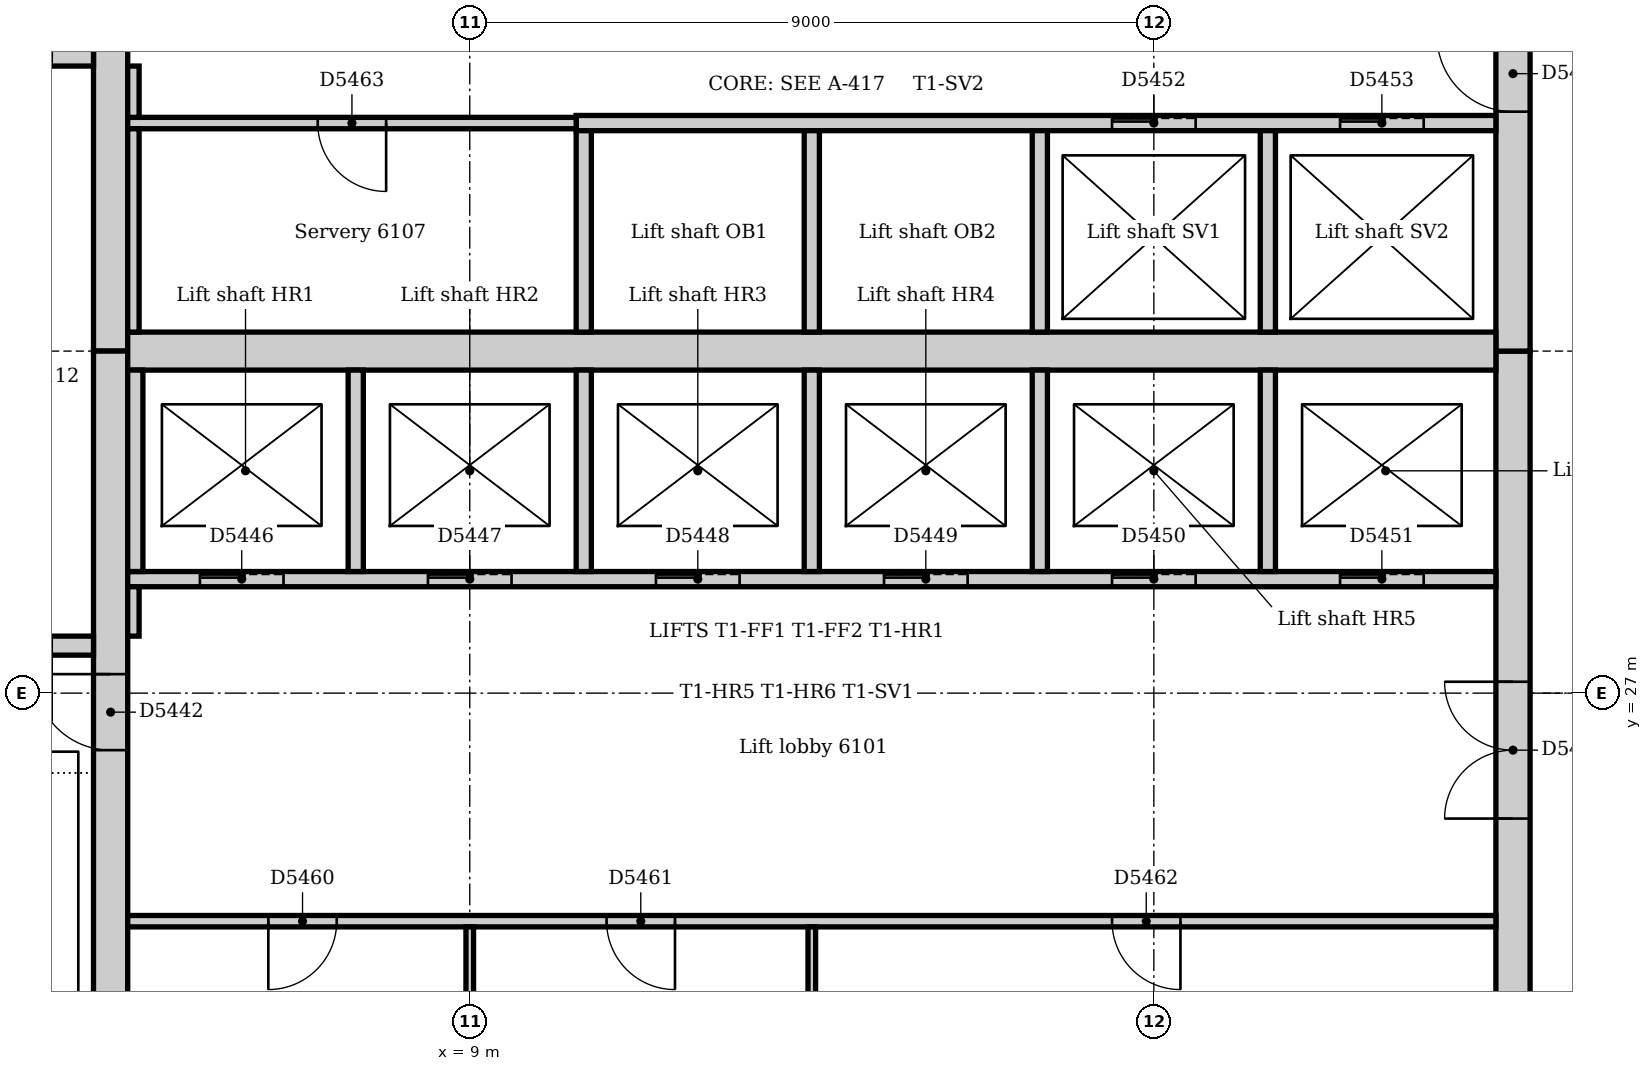
"""IFC4 building model, lengths in metres.
Left out: names, types, materials, properties, quantities, classifications, styles, units other than length and angle.
Written with IfcOpenShell. Run it as: python <this file> out.ifc"""

import sys

from ifc_helpers import new_model, si_unit, direction, frame, frame_2d, origin, place, context, subcontext, project, spatial, rectangle, extrude, element, fill, save


model = new_model("IFC4")
c1 = context("Model", 3, precision=1e-05, world=origin(), true_north=direction((0.0, 1.0)))
c2 = subcontext(c1, "Body", "Model", "MODEL_VIEW")
j1 = project(units=[si_unit("LENGTHUNIT", "METRE"), si_unit("PLANEANGLEUNIT", "RADIAN")], contexts=[c1])
p1 = place(None, origin())
s1 = spatial("IfcSite", under=j1, at=p1, CompositionType="ELEMENT")
p2 = place(p1, origin())
s2 = spatial("IfcBuilding", under=s1, at=p2, CompositionType="ELEMENT")
p3 = place(p2, frame((0.0, 0.0, 255.0)))
s3 = spatial("IfcBuildingStorey", under=s2, at=p3, CompositionType="ELEMENT", Elevation=255.0)
p4 = place(p3, frame((22.725, 21.0, 0.0), z_axis=(0.0, 0.0, 1.0), x_axis=(0.0, 1.0, 0.0)))
e1 = element("IfcWall", 1, at=p4, inside=s3, PredefinedType="SOLIDWALL", context=c2, shape_type="SweptSolid", body=[
    extrude(rectangle(XDim=10.5, YDim=0.45, at=frame_2d((5.25, 0.0))), origin(), (0.0, 0.0, 1.0), 4.0),
])
p5 = place(p4, frame((4.35, 0.0, 0.0)))
e2 = element("IfcOpeningElement", 2, at=p5, cuts=e1, PredefinedType="OPENING", context=c2, shape_type="SweptSolid", body=[
    extrude(rectangle(XDim=1.8, YDim=2.1, at=frame_2d((0.9, 1.05))), frame((0.0, 0.235, 0.0), z_axis=(0.0, -1.0, 0.0), x_axis=(1.0, 0.0, 0.0)), (0.0, 0.0, 1.0), 0.47),
])
p6 = place(p3, frame((22.725, 31.5, 0.0), z_axis=(0.0, 0.0, 1.0), x_axis=(0.0, 1.0, 0.0)))
e3 = element("IfcWall", 3, at=p6, inside=s3, PredefinedType="SOLIDWALL", context=c2, shape_type="SweptSolid", body=[
    extrude(rectangle(XDim=10.5, YDim=0.45, at=frame_2d((5.25, 0.0))), origin(), (0.0, 0.0, 1.0), 4.0),
])
p7 = place(p6, frame((3.15, 0.0, 0.0)))
e4 = element("IfcOpeningElement", 4, at=p7, cuts=e3, PredefinedType="OPENING", context=c2, shape_type="SweptSolid", body=[
    extrude(rectangle(XDim=1.0, YDim=2.1, at=frame_2d((0.5, 1.05))), frame((0.0, 0.235, 0.0), z_axis=(0.0, -1.0, 0.0), x_axis=(1.0, 0.0, 0.0)), (0.0, 0.0, 1.0), 0.47),
])
p8 = place(p6, frame((5.2, 0.0, 0.0)))
e5 = element("IfcOpeningElement", 5, at=p8, cuts=e3, PredefinedType="OPENING", context=c2, shape_type="SweptSolid", body=[
    extrude(rectangle(XDim=1.0, YDim=2.1, at=frame_2d((0.5, 1.05))), frame((0.0, 0.235, 0.0), z_axis=(0.0, -1.0, 0.0), x_axis=(1.0, 0.0, 0.0)), (0.0, 0.0, 1.0), 0.47),
])
p9 = place(p3, frame((4.275, 42.0, 0.0), z_axis=(0.0, 0.0, 1.0), x_axis=(0.0, -1.0, 0.0)))
e6 = element("IfcWall", 6, at=p9, inside=s3, PredefinedType="SOLIDWALL", context=c2, shape_type="SweptSolid", body=[
    extrude(rectangle(XDim=10.5, YDim=0.45, at=frame_2d((5.25, 0.0))), origin(), (0.0, 0.0, 1.0), 4.0),
])
p10 = place(p9, frame((5.3, 0.0, 0.0)))
e7 = element("IfcOpeningElement", 7, at=p10, cuts=e6, PredefinedType="OPENING", context=c2, shape_type="SweptSolid", body=[
    extrude(rectangle(XDim=1.0, YDim=2.1, at=frame_2d((0.5, 1.05))), frame((0.0, 0.235, 0.0), z_axis=(0.0, -1.0, 0.0), x_axis=(1.0, 0.0, 0.0)), (0.0, 0.0, 1.0), 0.47),
])
p11 = place(p3, frame((4.275, 31.5, 0.0), z_axis=(0.0, 0.0, 1.0), x_axis=(0.0, -1.0, 0.0)))
e8 = element("IfcWall", 8, at=p11, inside=s3, PredefinedType="SOLIDWALL", context=c2, shape_type="SweptSolid", body=[
    extrude(rectangle(XDim=10.5, YDim=0.45, at=frame_2d((5.25, 0.0))), origin(), (0.0, 0.0, 1.0), 4.0),
])
p12 = place(p11, frame((4.25, 0.0, 0.0)))
e9 = element("IfcOpeningElement", 9, at=p12, cuts=e8, PredefinedType="OPENING", context=c2, shape_type="SweptSolid", body=[
    extrude(rectangle(XDim=1.0, YDim=2.1, at=frame_2d((0.5, 1.05))), frame((0.0, 0.235, 0.0), z_axis=(0.0, -1.0, 0.0), x_axis=(1.0, 0.0, 0.0)), (0.0, 0.0, 1.0), 0.47),
])
p13 = place(p3, frame((4.5, 31.5, 0.0), z_axis=(0.0, 0.0, 1.0), x_axis=(1.0, 0.0, 0.0)))
e10 = element("IfcWall", 10, at=p13, inside=s3, PredefinedType="SOLIDWALL", context=c2, shape_type="SweptSolid", body=[
    extrude(rectangle(XDim=18.0, YDim=0.5, at=frame_2d((9.0, 0.0))), origin(), (0.0, 0.0, 1.0), 4.0),
])
p14 = place(p3, frame((4.05, 27.625, 0.0), z_axis=(0.0, 0.0, 1.0), x_axis=(-1.0, 0.0, 0.0)))
e11 = element("IfcWall", 11, at=p14, inside=s3, PredefinedType="SOLIDWALL", context=c2, shape_type="SweptSolid", body=[
    extrude(rectangle(XDim=3.69, YDim=0.25, at=frame_2d((1.845, 0.0))), origin(), (0.0, 0.0, 1.0), 4.0),
])
p15 = place(p14, frame((0.55, 0.0, 0.0)))
e12 = element("IfcOpeningElement", 12, at=p15, cuts=e11, PredefinedType="OPENING", context=c2, shape_type="SweptSolid", body=[
    extrude(rectangle(XDim=1.0, YDim=2.1, at=frame_2d((0.5, 1.05))), frame((0.0, 0.135, 0.0), z_axis=(0.0, -1.0, 0.0), x_axis=(1.0, 0.0, 0.0)), (0.0, 0.0, 1.0), 0.27),
])
p16 = place(p3, frame((0.36, 35.375, 0.0), z_axis=(0.0, 0.0, 1.0), x_axis=(1.0, 0.0, 0.0)))
e13 = element("IfcWall", 13, at=p16, inside=s3, PredefinedType="SOLIDWALL", context=c2, shape_type="SweptSolid", body=[
    extrude(rectangle(XDim=3.69, YDim=0.25, at=frame_2d((1.845, 0.0))), origin(), (0.0, 0.0, 1.0), 4.0),
])
p17 = place(p16, frame((2.14, 0.0, 0.0)))
e14 = element("IfcOpeningElement", 14, at=p17, cuts=e13, PredefinedType="OPENING", context=c2, shape_type="SweptSolid", body=[
    extrude(rectangle(XDim=1.0, YDim=2.1, at=frame_2d((0.5, 1.05))), frame((0.0, 0.135, 0.0), z_axis=(0.0, -1.0, 0.0), x_axis=(1.0, 0.0, 0.0)), (0.0, 0.0, 1.0), 0.27),
])
p18 = place(p3, frame((4.5, 28.5, 0.0), z_axis=(0.0, 0.0, 1.0), x_axis=(1.0, 0.0, 0.0)))
e15 = element("IfcWall", 15, at=p18, inside=s3, PredefinedType="PARTITIONING", context=c2, shape_type="SweptSolid", body=[
    extrude(rectangle(XDim=18.0, YDim=0.2, at=frame_2d((9.0, 0.0))), origin(), (0.0, 0.0, 1.0), 3.85),
])
p19 = place(p18, frame((0.95, 0.0, 0.0)))
e16 = element("IfcOpeningElement", 16, at=p19, cuts=e15, PredefinedType="OPENING", context=c2, shape_type="SweptSolid", body=[
    extrude(rectangle(XDim=1.1, YDim=2.1, at=frame_2d((0.55, 1.05))), frame((0.0, 0.11, 0.0), z_axis=(0.0, -1.0, 0.0), x_axis=(1.0, 0.0, 0.0)), (0.0, 0.0, 1.0), 0.22),
])
p20 = place(p18, frame((3.95, 0.0, 0.0)))
e17 = element("IfcOpeningElement", 17, at=p20, cuts=e15, PredefinedType="OPENING", context=c2, shape_type="SweptSolid", body=[
    extrude(rectangle(XDim=1.1, YDim=2.1, at=frame_2d((0.55, 1.05))), frame((0.0, 0.11, 0.0), z_axis=(0.0, -1.0, 0.0), x_axis=(1.0, 0.0, 0.0)), (0.0, 0.0, 1.0), 0.22),
])
p21 = place(p18, frame((6.95, 0.0, 0.0)))
e18 = element("IfcOpeningElement", 18, at=p21, cuts=e15, PredefinedType="OPENING", context=c2, shape_type="SweptSolid", body=[
    extrude(rectangle(XDim=1.1, YDim=2.1, at=frame_2d((0.55, 1.05))), frame((0.0, 0.11, 0.0), z_axis=(0.0, -1.0, 0.0), x_axis=(1.0, 0.0, 0.0)), (0.0, 0.0, 1.0), 0.22),
])
p22 = place(p18, frame((9.95, 0.0, 0.0)))
e19 = element("IfcOpeningElement", 19, at=p22, cuts=e15, PredefinedType="OPENING", context=c2, shape_type="SweptSolid", body=[
    extrude(rectangle(XDim=1.1, YDim=2.1, at=frame_2d((0.55, 1.05))), frame((0.0, 0.11, 0.0), z_axis=(0.0, -1.0, 0.0), x_axis=(1.0, 0.0, 0.0)), (0.0, 0.0, 1.0), 0.22),
])
p23 = place(p18, frame((12.95, 0.0, 0.0)))
e20 = element("IfcOpeningElement", 20, at=p23, cuts=e15, PredefinedType="OPENING", context=c2, shape_type="SweptSolid", body=[
    extrude(rectangle(XDim=1.1, YDim=2.1, at=frame_2d((0.55, 1.05))), frame((0.0, 0.11, 0.0), z_axis=(0.0, -1.0, 0.0), x_axis=(1.0, 0.0, 0.0)), (0.0, 0.0, 1.0), 0.22),
])
p24 = place(p18, frame((15.95, 0.0, 0.0)))
e21 = element("IfcOpeningElement", 21, at=p24, cuts=e15, PredefinedType="OPENING", context=c2, shape_type="SweptSolid", body=[
    extrude(rectangle(XDim=1.1, YDim=2.1, at=frame_2d((0.55, 1.05))), frame((0.0, 0.11, 0.0), z_axis=(0.0, -1.0, 0.0), x_axis=(1.0, 0.0, 0.0)), (0.0, 0.0, 1.0), 0.22),
])
p25 = place(p3, frame((10.4, 34.5, 0.0), z_axis=(0.0, 0.0, 1.0), x_axis=(1.0, 0.0, 0.0)))
e22 = element("IfcWall", 22, at=p25, inside=s3, PredefinedType="PARTITIONING", context=c2, shape_type="SweptSolid", body=[
    extrude(rectangle(XDim=12.1, YDim=0.2, at=frame_2d((6.05, 0.0))), origin(), (0.0, 0.0, 1.0), 3.85),
])
p26 = place(p25, frame((7.05, 0.0, 0.0)))
e23 = element("IfcOpeningElement", 23, at=p26, cuts=e22, PredefinedType="OPENING", context=c2, shape_type="SweptSolid", body=[
    extrude(rectangle(XDim=1.1, YDim=2.1, at=frame_2d((0.55, 1.05))), frame((0.0, 0.11, 0.0), z_axis=(0.0, -1.0, 0.0), x_axis=(1.0, 0.0, 0.0)), (0.0, 0.0, 1.0), 0.22),
])
p27 = place(p25, frame((10.05, 0.0, 0.0)))
e24 = element("IfcOpeningElement", 24, at=p27, cuts=e22, PredefinedType="OPENING", context=c2, shape_type="SweptSolid", body=[
    extrude(rectangle(XDim=1.1, YDim=2.1, at=frame_2d((0.55, 1.05))), frame((0.0, 0.11, 0.0), z_axis=(0.0, -1.0, 0.0), x_axis=(1.0, 0.0, 0.0)), (0.0, 0.0, 1.0), 0.22),
])
for number, where, z_axis, x_axis in (
    (25, (10.5, 28.6, 0.0), (0.0, 0.0, 1.0), (0.0, 1.0, 0.0)),
    (26, (10.5, 31.75, 0.0), (0.0, 0.0, 1.0), (0.0, 1.0, 0.0)),
    (27, (13.5, 28.6, 0.0), (0.0, 0.0, 1.0), (0.0, 1.0, 0.0)),
    (28, (13.5, 31.75, 0.0), (0.0, 0.0, 1.0), (0.0, 1.0, 0.0)),
    (29, (16.5, 28.6, 0.0), (0.0, 0.0, 1.0), (0.0, 1.0, 0.0)),
    (30, (16.5, 31.75, 0.0), (0.0, 0.0, 1.0), (0.0, 1.0, 0.0)),
    (31, (19.5, 28.6, 0.0), (0.0, 0.0, 1.0), (0.0, 1.0, 0.0)),
    (32, (19.5, 31.75, 0.0), (0.0, 0.0, 1.0), (0.0, 1.0, 0.0)),
    (33, (4.6, 28.6, 0.0), (0.0, 0.0, 1.0), (0.0, 1.0, 0.0)),
    (34, (7.5, 28.6, 0.0), (0.0, 0.0, 1.0), (0.0, 1.0, 0.0)),
):
    element("IfcWall", number, at=place(p3, frame(where, z_axis=z_axis, x_axis=x_axis)), inside=s3, PredefinedType="PARTITIONING", context=c2, shape_type="SweptSolid", body=[
        extrude(rectangle(XDim=2.65, YDim=0.2, at=frame_2d((1.325, 0.0))), origin(), (0.0, 0.0, 1.0), 3.85),
    ])
p28 = place(p3, frame((4.5, 24.0, 0.0), z_axis=(0.0, 0.0, 1.0), x_axis=(1.0, 0.0, 0.0)))
e35 = element("IfcWall", 35, at=p28, inside=s3, PredefinedType="PARTITIONING", context=c2, shape_type="SweptSolid", body=[
    extrude(rectangle(XDim=18.0, YDim=0.15, at=frame_2d((9.0, 0.0))), origin(), (0.0, 0.0, 1.0), 3.85),
])
p29 = place(p28, frame((1.85, 0.0, 0.0)))
e36 = element("IfcOpeningElement", 36, at=p29, cuts=e35, PredefinedType="OPENING", context=c2, shape_type="SweptSolid", body=[
    extrude(rectangle(XDim=0.9, YDim=2.1, at=frame_2d((0.45, 1.05))), frame((0.0, 0.085, 0.0), z_axis=(0.0, -1.0, 0.0), x_axis=(1.0, 0.0, 0.0)), (0.0, 0.0, 1.0), 0.17),
])
p30 = place(p28, frame((6.3, 0.0, 0.0)))
e37 = element("IfcOpeningElement", 37, at=p30, cuts=e35, PredefinedType="OPENING", context=c2, shape_type="SweptSolid", body=[
    extrude(rectangle(XDim=0.9, YDim=2.1, at=frame_2d((0.45, 1.05))), frame((0.0, 0.085, 0.0), z_axis=(0.0, -1.0, 0.0), x_axis=(1.0, 0.0, 0.0)), (0.0, 0.0, 1.0), 0.17),
])
p31 = place(p28, frame((12.95, 0.0, 0.0)))
e38 = element("IfcOpeningElement", 38, at=p31, cuts=e35, PredefinedType="OPENING", context=c2, shape_type="SweptSolid", body=[
    extrude(rectangle(XDim=0.9, YDim=2.1, at=frame_2d((0.45, 1.05))), frame((0.0, 0.085, 0.0), z_axis=(0.0, -1.0, 0.0), x_axis=(1.0, 0.0, 0.0)), (0.0, 0.0, 1.0), 0.17),
])
p32 = place(p3, frame((4.5, 34.5, 0.0), z_axis=(0.0, 0.0, 1.0), x_axis=(1.0, 0.0, 0.0)))
e39 = element("IfcWall", 39, at=p32, inside=s3, PredefinedType="PARTITIONING", context=c2, shape_type="SweptSolid", body=[
    extrude(rectangle(XDim=5.9, YDim=0.15, at=frame_2d((2.95, 0.0))), origin(), (0.0, 0.0, 1.0), 3.85),
])
p33 = place(p32, frame((2.5, 0.0, 0.0)))
e40 = element("IfcOpeningElement", 40, at=p33, cuts=e39, PredefinedType="OPENING", context=c2, shape_type="SweptSolid", body=[
    extrude(rectangle(XDim=0.9, YDim=2.1, at=frame_2d((0.45, 1.05))), frame((0.0, 0.085, 0.0), z_axis=(0.0, -1.0, 0.0), x_axis=(1.0, 0.0, 0.0)), (0.0, 0.0, 1.0), 0.17),
])
p34 = place(p3, frame((4.575, 34.575, 0.0), z_axis=(0.0, 0.0, 1.0), x_axis=(0.0, 1.0, 0.0)))
e41 = element("IfcWall", 41, at=p34, inside=s3, PredefinedType="PARTITIONING", context=c2, shape_type="SweptSolid", body=[
    extrude(rectangle(XDim=0.675, YDim=0.15, at=frame_2d((0.338, 0.0))), origin(), (0.0, 0.0, 1.0), 3.85),
])
p35 = place(p3, frame((4.575, 31.75, 0.0), z_axis=(0.0, 0.0, 1.0), x_axis=(0.0, 1.0, 0.0)))
e42 = element("IfcWall", 42, at=p35, inside=s3, PredefinedType="PARTITIONING", context=c2, shape_type="SweptSolid", body=[
    extrude(rectangle(XDim=2.675, YDim=0.15, at=frame_2d((1.337, 0.0))), origin(), (0.0, 0.0, 1.0), 3.85),
])
p36 = place(p3, frame((4.575, 27.75, 0.0), z_axis=(0.0, 0.0, 1.0), x_axis=(0.0, 1.0, 0.0)))
e43 = element("IfcWall", 43, at=p36, inside=s3, PredefinedType="PARTITIONING", context=c2, shape_type="SweptSolid", body=[
    extrude(rectangle(XDim=0.65, YDim=0.15, at=frame_2d((0.325, 0.0))), origin(), (0.0, 0.0, 1.0), 3.85),
])
for number, where, z_axis, x_axis in (
    (44, (9.0, 21.0, 0.0), (0.0, 0.0, 1.0), (0.0, 1.0, 0.0)),
    (45, (13.5, 21.0, 0.0), (0.0, 0.0, 1.0), (0.0, 1.0, 0.0)),
):
    element("IfcWall", number, at=place(p3, frame(where, z_axis=z_axis, x_axis=x_axis)), inside=s3, PredefinedType="PARTITIONING", context=c2, shape_type="SweptSolid", body=[
        extrude(rectangle(XDim=2.925, YDim=0.1, at=frame_2d((1.462, 0.0))), origin(), (0.0, 0.0, 1.0), 3.85),
    ])
p37 = place(p12, frame((1.0, 0.0, 0.0), z_axis=(0.0, 0.0, 1.0), x_axis=(-1.0, 0.0, 0.0)))
e46 = element("IfcDoor", 46, at=p37, inside=s3, OperationType="SINGLE_SWING_RIGHT", PredefinedType="DOOR", context=c2, shape_type="SweptSolid", body=[
    extrude(rectangle(XDim=1.0, YDim=2.1, at=frame_2d((0.5, 1.05))), frame((0.0, 0.025, 0.0), z_axis=(0.0, -1.0, 0.0), x_axis=(1.0, 0.0, 0.0)), (0.0, 0.0, 1.0), 0.05),
])
fill(e9, e46)
p38 = place(p19, origin())
e47 = element("IfcDoor", 47, at=p38, inside=s3, OperationType="SLIDING_TO_LEFT", PredefinedType="DOOR", context=c2, shape_type="SweptSolid", body=[
    extrude(rectangle(XDim=1.1, YDim=2.1, at=frame_2d((0.55, 1.05))), frame((0.0, 0.025, 0.0), z_axis=(0.0, -1.0, 0.0), x_axis=(1.0, 0.0, 0.0)), (0.0, 0.0, 1.0), 0.05),
])
fill(e16, e47)
p39 = place(p20, origin())
e48 = element("IfcDoor", 48, at=p39, inside=s3, OperationType="SLIDING_TO_LEFT", PredefinedType="DOOR", context=c2, shape_type="SweptSolid", body=[
    extrude(rectangle(XDim=1.1, YDim=2.1, at=frame_2d((0.55, 1.05))), frame((0.0, 0.025, 0.0), z_axis=(0.0, -1.0, 0.0), x_axis=(1.0, 0.0, 0.0)), (0.0, 0.0, 1.0), 0.05),
])
fill(e17, e48)
p40 = place(p21, origin())
e49 = element("IfcDoor", 49, at=p40, inside=s3, OperationType="SLIDING_TO_LEFT", PredefinedType="DOOR", context=c2, shape_type="SweptSolid", body=[
    extrude(rectangle(XDim=1.1, YDim=2.1, at=frame_2d((0.55, 1.05))), frame((0.0, 0.025, 0.0), z_axis=(0.0, -1.0, 0.0), x_axis=(1.0, 0.0, 0.0)), (0.0, 0.0, 1.0), 0.05),
])
fill(e18, e49)
p41 = place(p22, origin())
e50 = element("IfcDoor", 50, at=p41, inside=s3, OperationType="SLIDING_TO_LEFT", PredefinedType="DOOR", context=c2, shape_type="SweptSolid", body=[
    extrude(rectangle(XDim=1.1, YDim=2.1, at=frame_2d((0.55, 1.05))), frame((0.0, 0.025, 0.0), z_axis=(0.0, -1.0, 0.0), x_axis=(1.0, 0.0, 0.0)), (0.0, 0.0, 1.0), 0.05),
])
fill(e19, e50)
p42 = place(p23, origin())
e51 = element("IfcDoor", 51, at=p42, inside=s3, OperationType="SLIDING_TO_LEFT", PredefinedType="DOOR", context=c2, shape_type="SweptSolid", body=[
    extrude(rectangle(XDim=1.1, YDim=2.1, at=frame_2d((0.55, 1.05))), frame((0.0, 0.025, 0.0), z_axis=(0.0, -1.0, 0.0), x_axis=(1.0, 0.0, 0.0)), (0.0, 0.0, 1.0), 0.05),
])
fill(e20, e51)
p43 = place(p24, origin())
e52 = element("IfcDoor", 52, at=p43, inside=s3, OperationType="SLIDING_TO_LEFT", PredefinedType="DOOR", context=c2, shape_type="SweptSolid", body=[
    extrude(rectangle(XDim=1.1, YDim=2.1, at=frame_2d((0.55, 1.05))), frame((0.0, 0.025, 0.0), z_axis=(0.0, -1.0, 0.0), x_axis=(1.0, 0.0, 0.0)), (0.0, 0.0, 1.0), 0.05),
])
fill(e21, e52)
p44 = place(p26, origin())
e53 = element("IfcDoor", 53, at=p44, inside=s3, OperationType="SLIDING_TO_LEFT", PredefinedType="DOOR", context=c2, shape_type="SweptSolid", body=[
    extrude(rectangle(XDim=1.1, YDim=2.1, at=frame_2d((0.55, 1.05))), frame((0.0, 0.025, 0.0), z_axis=(0.0, -1.0, 0.0), x_axis=(1.0, 0.0, 0.0)), (0.0, 0.0, 1.0), 0.05),
])
fill(e23, e53)
p45 = place(p27, origin())
e54 = element("IfcDoor", 54, at=p45, inside=s3, OperationType="SLIDING_TO_LEFT", PredefinedType="DOOR", context=c2, shape_type="SweptSolid", body=[
    extrude(rectangle(XDim=1.1, YDim=2.1, at=frame_2d((0.55, 1.05))), frame((0.0, 0.025, 0.0), z_axis=(0.0, -1.0, 0.0), x_axis=(1.0, 0.0, 0.0)), (0.0, 0.0, 1.0), 0.05),
])
fill(e24, e54)
p46 = place(p5, origin())
e55 = element("IfcDoor", 55, at=p46, inside=s3, OperationType="DOUBLE_DOOR_DOUBLE_SWING", PredefinedType="DOOR", context=c2, shape_type="SweptSolid", body=[
    extrude(rectangle(XDim=1.8, YDim=2.1, at=frame_2d((0.9, 1.05))), frame((0.0, 0.025, 0.0), z_axis=(0.0, -1.0, 0.0), x_axis=(1.0, 0.0, 0.0)), (0.0, 0.0, 1.0), 0.05),
])
fill(e2, e55)
p47 = place(p7, origin())
e56 = element("IfcDoor", 56, at=p47, inside=s3, OperationType="SINGLE_SWING_RIGHT", PredefinedType="DOOR", context=c2, shape_type="SweptSolid", body=[
    extrude(rectangle(XDim=1.0, YDim=2.1, at=frame_2d((0.5, 1.05))), frame((0.0, 0.025, 0.0), z_axis=(0.0, -1.0, 0.0), x_axis=(1.0, 0.0, 0.0)), (0.0, 0.0, 1.0), 0.05),
])
fill(e4, e56)
p48 = place(p29, frame((0.9, 0.0, 0.0), z_axis=(0.0, 0.0, 1.0), x_axis=(-1.0, 0.0, 0.0)))
e57 = element("IfcDoor", 57, at=p48, inside=s3, OperationType="SINGLE_SWING_RIGHT", PredefinedType="DOOR", context=c2, shape_type="SweptSolid", body=[
    extrude(rectangle(XDim=0.9, YDim=2.1, at=frame_2d((0.45, 1.05))), frame((0.0, 0.025, 0.0), z_axis=(0.0, -1.0, 0.0), x_axis=(1.0, 0.0, 0.0)), (0.0, 0.0, 1.0), 0.05),
])
fill(e36, e57)
p49 = place(p30, frame((0.9, 0.0, 0.0), z_axis=(0.0, 0.0, 1.0), x_axis=(-1.0, 0.0, 0.0)))
e58 = element("IfcDoor", 58, at=p49, inside=s3, OperationType="SINGLE_SWING_LEFT", PredefinedType="DOOR", context=c2, shape_type="SweptSolid", body=[
    extrude(rectangle(XDim=0.9, YDim=2.1, at=frame_2d((0.45, 1.05))), frame((0.0, 0.025, 0.0), z_axis=(0.0, -1.0, 0.0), x_axis=(1.0, 0.0, 0.0)), (0.0, 0.0, 1.0), 0.05),
])
fill(e37, e58)
p50 = place(p31, frame((0.9, 0.0, 0.0), z_axis=(0.0, 0.0, 1.0), x_axis=(-1.0, 0.0, 0.0)))
e59 = element("IfcDoor", 59, at=p50, inside=s3, OperationType="SINGLE_SWING_LEFT", PredefinedType="DOOR", context=c2, shape_type="SweptSolid", body=[
    extrude(rectangle(XDim=0.9, YDim=2.1, at=frame_2d((0.45, 1.05))), frame((0.0, 0.025, 0.0), z_axis=(0.0, -1.0, 0.0), x_axis=(1.0, 0.0, 0.0)), (0.0, 0.0, 1.0), 0.05),
])
fill(e38, e59)
p51 = place(p33, frame((0.9, 0.0, 0.0), z_axis=(0.0, 0.0, 1.0), x_axis=(-1.0, 0.0, 0.0)))
e60 = element("IfcDoor", 60, at=p51, inside=s3, OperationType="SINGLE_SWING_LEFT", PredefinedType="DOOR", context=c2, shape_type="SweptSolid", body=[
    extrude(rectangle(XDim=0.9, YDim=2.1, at=frame_2d((0.45, 1.05))), frame((0.0, 0.025, 0.0), z_axis=(0.0, -1.0, 0.0), x_axis=(1.0, 0.0, 0.0)), (0.0, 0.0, 1.0), 0.05),
])
fill(e40, e60)
save(model, sys.argv[1])
